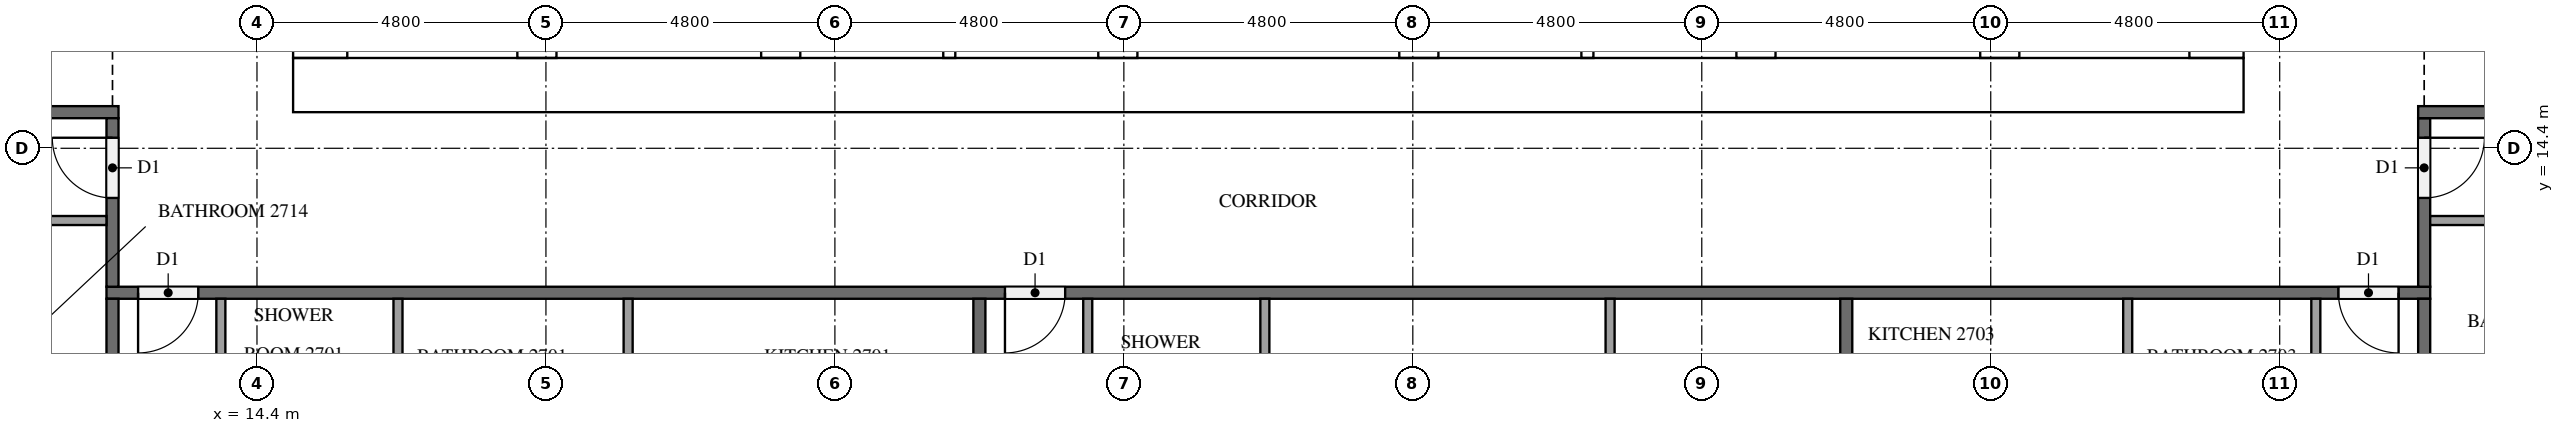
"""IFC4 building model, lengths in metres.
Left out: names, types, materials, properties, quantities, classifications, styles, units other than length and angle.
Written with IfcOpenShell. Run it as: python <this file> out.ifc"""

import sys

from ifc_helpers import new_model, si_unit, direction, frame, frame_2d, origin, place, context, subcontext, project, spatial, rectangle, extrude, element, fill, save


model = new_model("IFC4")
c1 = context("Model", 3, precision=1e-05, world=origin(), true_north=direction((0.0, 1.0)))
c2 = subcontext(c1, "Body", "Model", "MODEL_VIEW")
j1 = project(units=[si_unit("LENGTHUNIT", "METRE"), si_unit("PLANEANGLEUNIT", "RADIAN")], contexts=[c1])
p1 = place(None, origin())
s1 = spatial("IfcSite", under=j1, at=p1, CompositionType="ELEMENT")
p2 = place(p1, origin())
s2 = spatial("IfcBuilding", under=s1, at=p2, CompositionType="ELEMENT")
p3 = place(p2, frame((0.0, 0.0, 106.7)))
s3 = spatial("IfcBuildingStorey", under=s2, at=p3, CompositionType="ELEMENT", Elevation=106.7)
p4 = place(p3, frame((15.0, 15.45, 0.0), z_axis=(0.0, 0.0, 1.0), x_axis=(1.0, 0.0, 0.0)))
e1 = element("IfcWall", 1, at=p4, inside=s3, PredefinedType="SHEAR", context=c2, shape_type="SweptSolid", body=[
    extrude(rectangle(XDim=32.4, YDim=0.9, at=frame_2d((16.2, 0.0))), origin(), (0.0, 0.0, 1.0), 3.2),
])
p5 = place(p4, frame((15.3, 0.0, 0.0)))
e2 = element("IfcOpeningElement", 2, at=p5, cuts=e1, PredefinedType="OPENING", context=c2, shape_type="SweptSolid", body=[
    extrude(rectangle(XDim=1.8, YDim=2.1, at=frame_2d((0.9, 1.05))), frame((0.0, 0.46, 0.0), z_axis=(0.0, -1.0, 0.0), x_axis=(1.0, 0.0, 0.0)), (0.0, 0.0, 1.0), 0.92),
])
p6 = place(p3, frame((15.45, 15.9, 0.0), z_axis=(0.0, 0.0, 1.0), x_axis=(0.0, 1.0, 0.0)))
e3 = element("IfcWall", 3, at=p6, inside=s3, PredefinedType="SHEAR", context=c2, shape_type="SweptSolid", body=[
    extrude(rectangle(XDim=21.0, YDim=0.9, at=frame_2d((10.5, 0.0))), origin(), (0.0, 0.0, 1.0), 3.2),
])
p7 = place(p6, frame((4.86, 0.0, 0.0)))
e4 = element("IfcOpeningElement", 4, at=p7, cuts=e3, PredefinedType="OPENING", context=c2, shape_type="SweptSolid", body=[
    extrude(rectangle(XDim=1.2, YDim=2.1, at=frame_2d((0.6, 1.05))), frame((0.0, 0.46, 0.0), z_axis=(0.0, -1.0, 0.0), x_axis=(1.0, 0.0, 0.0)), (0.0, 0.0, 1.0), 0.92),
])
p8 = place(p3, frame((46.95, 15.9, 0.0), z_axis=(0.0, 0.0, 1.0), x_axis=(0.0, 1.0, 0.0)))
e5 = element("IfcWall", 5, at=p8, inside=s3, PredefinedType="SHEAR", context=c2, shape_type="SweptSolid", body=[
    extrude(rectangle(XDim=21.0, YDim=0.9, at=frame_2d((10.5, 0.0))), origin(), (0.0, 0.0, 1.0), 3.2),
])
p9 = place(p8, frame((10.2, 0.0, 0.0)))
e6 = element("IfcOpeningElement", 6, at=p9, cuts=e5, PredefinedType="OPENING", context=c2, shape_type="SweptSolid", body=[
    extrude(rectangle(XDim=1.2, YDim=2.1, at=frame_2d((0.6, 1.05))), frame((0.0, 0.46, 0.0), z_axis=(0.0, -1.0, 0.0), x_axis=(1.0, 0.0, 0.0)), (0.0, 0.0, 1.0), 0.92),
])
p10 = place(p3, frame((19.05, 15.9, 0.0), z_axis=(0.0, 0.0, 1.0), x_axis=(0.0, 1.0, 0.0)))
e7 = element("IfcWall", 7, at=p10, inside=s3, PredefinedType="SHEAR", context=c2, shape_type="SweptSolid", body=[
    extrude(rectangle(XDim=15.025, YDim=0.65, at=frame_2d((7.513, 0.0))), origin(), (0.0, 0.0, 1.0), 3.2),
])
p11 = place(p10, frame((9.55, 0.0, 0.0)))
e8 = element("IfcOpeningElement", 8, at=p11, cuts=e7, PredefinedType="OPENING", context=c2, shape_type="SweptSolid", body=[
    extrude(rectangle(XDim=1.1, YDim=2.1, at=frame_2d((0.55, 1.05))), frame((0.0, 0.335, 0.0), z_axis=(0.0, -1.0, 0.0), x_axis=(1.0, 0.0, 0.0)), (0.0, 0.0, 1.0), 0.67),
])
p12 = place(p10, frame((13.05, 0.0, 0.0)))
e9 = element("IfcOpeningElement", 9, at=p12, cuts=e7, PredefinedType="OPENING", context=c2, shape_type="SweptSolid", body=[
    extrude(rectangle(XDim=1.1, YDim=2.1, at=frame_2d((0.55, 1.05))), frame((0.0, 0.335, 0.0), z_axis=(0.0, -1.0, 0.0), x_axis=(1.0, 0.0, 0.0)), (0.0, 0.0, 1.0), 0.67),
])
p13 = place(p10, frame((0.3, 0.0, 0.0)))
e10 = element("IfcOpeningElement", 10, at=p13, cuts=e7, PredefinedType="OPENING", context=c2, shape_type="SweptSolid", body=[
    extrude(rectangle(XDim=1.2, YDim=2.1, at=frame_2d((0.6, 1.05))), frame((0.0, 0.335, 0.0), z_axis=(0.0, -1.0, 0.0), x_axis=(1.0, 0.0, 0.0)), (0.0, 0.0, 1.0), 0.67),
])
p14 = place(p3, frame((23.1, 15.9, 0.0), z_axis=(0.0, 0.0, 1.0), x_axis=(0.0, 1.0, 0.0)))
e11 = element("IfcWall", 11, at=p14, inside=s3, PredefinedType="SHEAR", context=c2, shape_type="SweptSolid", body=[
    extrude(rectangle(XDim=21.0, YDim=0.65, at=frame_2d((10.5, 0.0))), origin(), (0.0, 0.0, 1.0), 3.2),
])
p15 = place(p3, frame((39.3, 15.9, 0.0), z_axis=(0.0, 0.0, 1.0), x_axis=(0.0, 1.0, 0.0)))
e12 = element("IfcWall", 12, at=p15, inside=s3, PredefinedType="SHEAR", context=c2, shape_type="SweptSolid", body=[
    extrude(rectangle(XDim=8.35, YDim=0.65, at=frame_2d((4.175, 0.0))), origin(), (0.0, 0.0, 1.0), 3.2),
])
p16 = place(p3, frame((43.35, 15.9, 0.0), z_axis=(0.0, 0.0, 1.0), x_axis=(0.0, 1.0, 0.0)))
e13 = element("IfcWall", 13, at=p16, inside=s3, PredefinedType="SHEAR", context=c2, shape_type="SweptSolid", body=[
    extrude(rectangle(XDim=8.35, YDim=0.65, at=frame_2d((4.175, 0.0))), origin(), (0.0, 0.0, 1.0), 3.2),
])
p17 = place(p16, frame((0.3, 0.0, 0.0)))
e14 = element("IfcOpeningElement", 14, at=p17, cuts=e13, PredefinedType="OPENING", context=c2, shape_type="SweptSolid", body=[
    extrude(rectangle(XDim=1.2, YDim=2.1, at=frame_2d((0.6, 1.05))), frame((0.0, 0.335, 0.0), z_axis=(0.0, -1.0, 0.0), x_axis=(1.0, 0.0, 0.0)), (0.0, 0.0, 1.0), 0.67),
])
for number, where, z_axis, x_axis in (
    (15, (28.7, 15.9, 0.0), (0.0, 0.0, 1.0), (0.0, 1.0, 0.0)),
    (16, (33.7, 15.9, 0.0), (0.0, 0.0, 1.0), (0.0, 1.0, 0.0)),
):
    element("IfcWall", number, at=place(p3, frame(where, z_axis=z_axis, x_axis=x_axis)), inside=s3, PredefinedType="SHEAR", context=c2, shape_type="SweptSolid", body=[
        extrude(rectangle(XDim=2.525, YDim=0.65, at=frame_2d((1.263, 0.0))), origin(), (0.0, 0.0, 1.0), 3.2),
    ])
for number, where, z_axis, x_axis in (
    (17, (25.9, 15.9, 0.0), (0.0, 0.0, 1.0), (0.0, 1.0, 0.0)),
    (18, (36.5, 15.9, 0.0), (0.0, 0.0, 1.0), (0.0, 1.0, 0.0)),
):
    element("IfcWall", number, at=place(p3, frame(where, z_axis=z_axis, x_axis=x_axis)), inside=s3, PredefinedType="SOLIDWALL", context=c2, shape_type="SweptSolid", body=[
        extrude(rectangle(XDim=2.525, YDim=0.2, at=frame_2d((1.263, 0.0))), origin(), (0.0, 0.0, 1.0), 3.2),
    ])
p18 = place(p3, frame((50.5, 12.0, 0.0), z_axis=(0.0, 0.0, 1.0), x_axis=(-1.0, 0.0, 0.0)))
e19 = element("IfcWall", 19, at=p18, inside=s3, PredefinedType="PARTITIONING", context=c2, shape_type="SweptSolid", body=[
    extrude(rectangle(XDim=38.6, YDim=0.2, at=frame_2d((19.3, 0.0))), origin(), (0.0, 0.0, 1.0), 3.2),
])
p19 = place(p18, frame((37.075, 0.0, 0.0)))
e20 = element("IfcOpeningElement", 20, at=p19, cuts=e19, PredefinedType="OPENING", context=c2, shape_type="SweptSolid", body=[
    extrude(rectangle(XDim=1.0, YDim=2.1, at=frame_2d((0.5, 1.05))), frame((0.0, 0.11, 0.0), z_axis=(0.0, -1.0, 0.0), x_axis=(1.0, 0.0, 0.0)), (0.0, 0.0, 1.0), 0.22),
])
p20 = place(p18, frame((22.675, 0.0, 0.0)))
e21 = element("IfcOpeningElement", 21, at=p20, cuts=e19, PredefinedType="OPENING", context=c2, shape_type="SweptSolid", body=[
    extrude(rectangle(XDim=1.0, YDim=2.1, at=frame_2d((0.5, 1.05))), frame((0.0, 0.11, 0.0), z_axis=(0.0, -1.0, 0.0), x_axis=(1.0, 0.0, 0.0)), (0.0, 0.0, 1.0), 0.22),
])
p21 = place(p18, frame((0.525, 0.0, 0.0)))
e22 = element("IfcOpeningElement", 22, at=p21, cuts=e19, PredefinedType="OPENING", context=c2, shape_type="SweptSolid", body=[
    extrude(rectangle(XDim=1.0, YDim=2.1, at=frame_2d((0.5, 1.05))), frame((0.0, 0.11, 0.0), z_axis=(0.0, -1.0, 0.0), x_axis=(1.0, 0.0, 0.0)), (0.0, 0.0, 1.0), 0.22),
])
p22 = place(p3, frame((50.4, 14.9, 0.0), z_axis=(0.0, 0.0, 1.0), x_axis=(0.0, -1.0, 0.0)))
e23 = element("IfcWall", 23, at=p22, inside=s3, PredefinedType="PARTITIONING", context=c2, shape_type="SweptSolid", body=[
    extrude(rectangle(XDim=2.8, YDim=0.2, at=frame_2d((1.4, 0.0))), origin(), (0.0, 0.0, 1.0), 3.2),
])
p23 = place(p22, frame((0.325, 0.0, 0.0)))
e24 = element("IfcOpeningElement", 24, at=p23, cuts=e23, PredefinedType="OPENING", context=c2, shape_type="SweptSolid", body=[
    extrude(rectangle(XDim=1.0, YDim=2.1, at=frame_2d((0.5, 1.05))), frame((0.0, 0.11, 0.0), z_axis=(0.0, -1.0, 0.0), x_axis=(1.0, 0.0, 0.0)), (0.0, 0.0, 1.0), 0.22),
])
p24 = place(p3, frame((50.3, 15.0, 0.0), z_axis=(0.0, 0.0, 1.0), x_axis=(1.0, 0.0, 0.0)))
e25 = element("IfcWall", 25, at=p24, inside=s3, PredefinedType="PARTITIONING", context=c2, shape_type="SweptSolid", body=[
    extrude(rectangle(XDim=2.2, YDim=0.2, at=frame_2d((1.1, 0.0))), origin(), (0.0, 0.0, 1.0), 3.2),
])
p25 = place(p3, frame((9.9, 15.0, 0.0), z_axis=(0.0, 0.0, 1.0), x_axis=(1.0, 0.0, 0.0)))
e26 = element("IfcWall", 26, at=p25, inside=s3, PredefinedType="PARTITIONING", context=c2, shape_type="SweptSolid", body=[
    extrude(rectangle(XDim=2.2, YDim=0.2, at=frame_2d((1.1, 0.0))), origin(), (0.0, 0.0, 1.0), 3.2),
])
p26 = place(p3, frame((12.0, 12.1, 0.0), z_axis=(0.0, 0.0, 1.0), x_axis=(0.0, 1.0, 0.0)))
e27 = element("IfcWall", 27, at=p26, inside=s3, PredefinedType="PARTITIONING", context=c2, shape_type="SweptSolid", body=[
    extrude(rectangle(XDim=2.8, YDim=0.2, at=frame_2d((1.4, 0.0))), origin(), (0.0, 0.0, 1.0), 3.2),
])
p27 = place(p26, frame((1.475, 0.0, 0.0)))
e28 = element("IfcOpeningElement", 28, at=p27, cuts=e27, PredefinedType="OPENING", context=c2, shape_type="SweptSolid", body=[
    extrude(rectangle(XDim=1.0, YDim=2.1, at=frame_2d((0.5, 1.05))), frame((0.0, 0.11, 0.0), z_axis=(0.0, -1.0, 0.0), x_axis=(1.0, 0.0, 0.0)), (0.0, 0.0, 1.0), 0.22),
])
for number, where, z_axis, x_axis in (
    (29, (26.4, 11.9, 0.0), (0.0, 0.0, 1.0), (0.0, -1.0, 0.0)),
    (30, (12.0, 4.9, 0.0), (0.0, 0.0, 1.0), (0.0, 1.0, 0.0)),
    (31, (40.8, 11.9, 0.0), (0.0, 0.0, 1.0), (0.0, -1.0, 0.0)),
    (32, (50.4, 11.9, 0.0), (0.0, 0.0, 1.0), (0.0, -1.0, 0.0)),
):
    element("IfcWall", number, at=place(p3, frame(where, z_axis=z_axis, x_axis=x_axis)), inside=s3, PredefinedType="PARTITIONING", context=c2, shape_type="SweptSolid", body=[
        extrude(rectangle(XDim=7.0, YDim=0.2, at=frame_2d((3.5, 0.0))), origin(), (0.0, 0.0, 1.0), 3.2),
    ])
for number, where, z_axis, x_axis in (
    (33, (16.742, 11.9, 0.0), (0.0, 0.0, 1.0), (0.0, -1.0, 0.0)),
    (34, (20.565, 11.9, 0.0), (0.0, 0.0, 1.0), (0.0, -1.0, 0.0)),
):
    element("IfcWall", number, at=place(p3, frame(where, z_axis=z_axis, x_axis=x_axis)), inside=s3, PredefinedType="PARTITIONING", context=c2, shape_type="SweptSolid", body=[
        extrude(rectangle(XDim=1.925, YDim=0.15, at=frame_2d((0.962, 0.0))), origin(), (0.0, 0.0, 1.0), 3.2),
    ])
p28 = place(p3, frame((13.8, 11.9, 0.0), z_axis=(0.0, 0.0, 1.0), x_axis=(0.0, -1.0, 0.0)))
e35 = element("IfcWall", 35, at=p28, inside=s3, PredefinedType="PARTITIONING", context=c2, shape_type="SweptSolid", body=[
    extrude(rectangle(XDim=2.075, YDim=0.15, at=frame_2d((1.038, 0.0))), origin(), (0.0, 0.0, 1.0), 3.2),
])
for number, where, z_axis, x_axis in (
    (36, (31.142, 11.9, 0.0), (0.0, 0.0, 1.0), (0.0, -1.0, 0.0)),
    (37, (36.877, 11.9, 0.0), (0.0, 0.0, 1.0), (0.0, -1.0, 0.0)),
):
    element("IfcWall", number, at=place(p3, frame(where, z_axis=z_axis, x_axis=x_axis)), inside=s3, PredefinedType="PARTITIONING", context=c2, shape_type="SweptSolid", body=[
        extrude(rectangle(XDim=2.375, YDim=0.15, at=frame_2d((1.188, 0.0))), origin(), (0.0, 0.0, 1.0), 3.2),
    ])
p29 = place(p3, frame((28.2, 11.9, 0.0), z_axis=(0.0, 0.0, 1.0), x_axis=(0.0, -1.0, 0.0)))
e38 = element("IfcWall", 38, at=p29, inside=s3, PredefinedType="PARTITIONING", context=c2, shape_type="SweptSolid", body=[
    extrude(rectangle(XDim=2.525, YDim=0.15, at=frame_2d((1.262, 0.0))), origin(), (0.0, 0.0, 1.0), 3.2),
])
p30 = place(p3, frame((45.475, 11.9, 0.0), z_axis=(0.0, 0.0, 1.0), x_axis=(0.0, -1.0, 0.0)))
e39 = element("IfcWall", 39, at=p30, inside=s3, PredefinedType="PARTITIONING", context=c2, shape_type="SweptSolid", body=[
    extrude(rectangle(XDim=1.925, YDim=0.15, at=frame_2d((0.962, 0.0))), origin(), (0.0, 0.0, 1.0), 3.2),
])
p31 = place(p3, frame((48.6, 11.9, 0.0), z_axis=(0.0, 0.0, 1.0), x_axis=(0.0, -1.0, 0.0)))
e40 = element("IfcWall", 40, at=p31, inside=s3, PredefinedType="PARTITIONING", context=c2, shape_type="SweptSolid", body=[
    extrude(rectangle(XDim=2.075, YDim=0.15, at=frame_2d((1.038, 0.0))), origin(), (0.0, 0.0, 1.0), 3.2),
])
p32 = place(p3, frame((50.5, 13.2, 0.0), z_axis=(0.0, 0.0, 1.0), x_axis=(1.0, 0.0, 0.0)))
e41 = element("IfcWall", 41, at=p32, inside=s3, PredefinedType="PARTITIONING", context=c2, shape_type="SweptSolid", body=[
    extrude(rectangle(XDim=3.875, YDim=0.15, at=frame_2d((1.938, 0.0))), origin(), (0.0, 0.0, 1.0), 3.2),
])
p33 = place(p3, frame((11.9, 13.2, 0.0), z_axis=(0.0, 0.0, 1.0), x_axis=(-1.0, 0.0, 0.0)))
e42 = element("IfcWall", 42, at=p33, inside=s3, PredefinedType="PARTITIONING", context=c2, shape_type="SweptSolid", body=[
    extrude(rectangle(XDim=2.225, YDim=0.15, at=frame_2d((1.112, 0.0))), origin(), (0.0, 0.0, 1.0), 3.2),
])
p34 = place(p5, frame((1.8, 0.0, 0.0), z_axis=(0.0, 0.0, 1.0), x_axis=(-1.0, 0.0, 0.0)))
e43 = element("IfcDoor", 43, at=p34, inside=s3, OperationType="DOUBLE_DOOR_SINGLE_SWING", PredefinedType="DOOR", context=c2, shape_type="SweptSolid", body=[
    extrude(rectangle(XDim=1.8, YDim=2.1, at=frame_2d((0.9, 1.05))), frame((0.0, 0.025, 0.0), z_axis=(0.0, -1.0, 0.0), x_axis=(1.0, 0.0, 0.0)), (0.0, 0.0, 1.0), 0.05),
])
fill(e2, e43)
p35 = place(p19, origin())
e44 = element("IfcDoor", 44, at=p35, inside=s3, OperationType="SINGLE_SWING_RIGHT", PredefinedType="DOOR", context=c2, shape_type="SweptSolid", body=[
    extrude(rectangle(XDim=1.0, YDim=2.1, at=frame_2d((0.5, 1.05))), frame((0.0, 0.025, 0.0), z_axis=(0.0, -1.0, 0.0), x_axis=(1.0, 0.0, 0.0)), (0.0, 0.0, 1.0), 0.05),
])
fill(e20, e44)
p36 = place(p20, origin())
e45 = element("IfcDoor", 45, at=p36, inside=s3, OperationType="SINGLE_SWING_RIGHT", PredefinedType="DOOR", context=c2, shape_type="SweptSolid", body=[
    extrude(rectangle(XDim=1.0, YDim=2.1, at=frame_2d((0.5, 1.05))), frame((0.0, 0.025, 0.0), z_axis=(0.0, -1.0, 0.0), x_axis=(1.0, 0.0, 0.0)), (0.0, 0.0, 1.0), 0.05),
])
fill(e21, e45)
p37 = place(p21, origin())
e46 = element("IfcDoor", 46, at=p37, inside=s3, OperationType="SINGLE_SWING_LEFT", PredefinedType="DOOR", context=c2, shape_type="SweptSolid", body=[
    extrude(rectangle(XDim=1.0, YDim=2.1, at=frame_2d((0.5, 1.05))), frame((0.0, 0.025, 0.0), z_axis=(0.0, -1.0, 0.0), x_axis=(1.0, 0.0, 0.0)), (0.0, 0.0, 1.0), 0.05),
])
fill(e22, e46)
p38 = place(p23, origin())
e47 = element("IfcDoor", 47, at=p38, inside=s3, OperationType="SINGLE_SWING_LEFT", PredefinedType="DOOR", context=c2, shape_type="SweptSolid", body=[
    extrude(rectangle(XDim=1.0, YDim=2.1, at=frame_2d((0.5, 1.05))), frame((0.0, 0.025, 0.0), z_axis=(0.0, -1.0, 0.0), x_axis=(1.0, 0.0, 0.0)), (0.0, 0.0, 1.0), 0.05),
])
fill(e24, e47)
p39 = place(p27, origin())
e48 = element("IfcDoor", 48, at=p39, inside=s3, OperationType="SINGLE_SWING_RIGHT", PredefinedType="DOOR", context=c2, shape_type="SweptSolid", body=[
    extrude(rectangle(XDim=1.0, YDim=2.1, at=frame_2d((0.5, 1.05))), frame((0.0, 0.025, 0.0), z_axis=(0.0, -1.0, 0.0), x_axis=(1.0, 0.0, 0.0)), (0.0, 0.0, 1.0), 0.05),
])
fill(e28, e48)
save(model, sys.argv[1])
